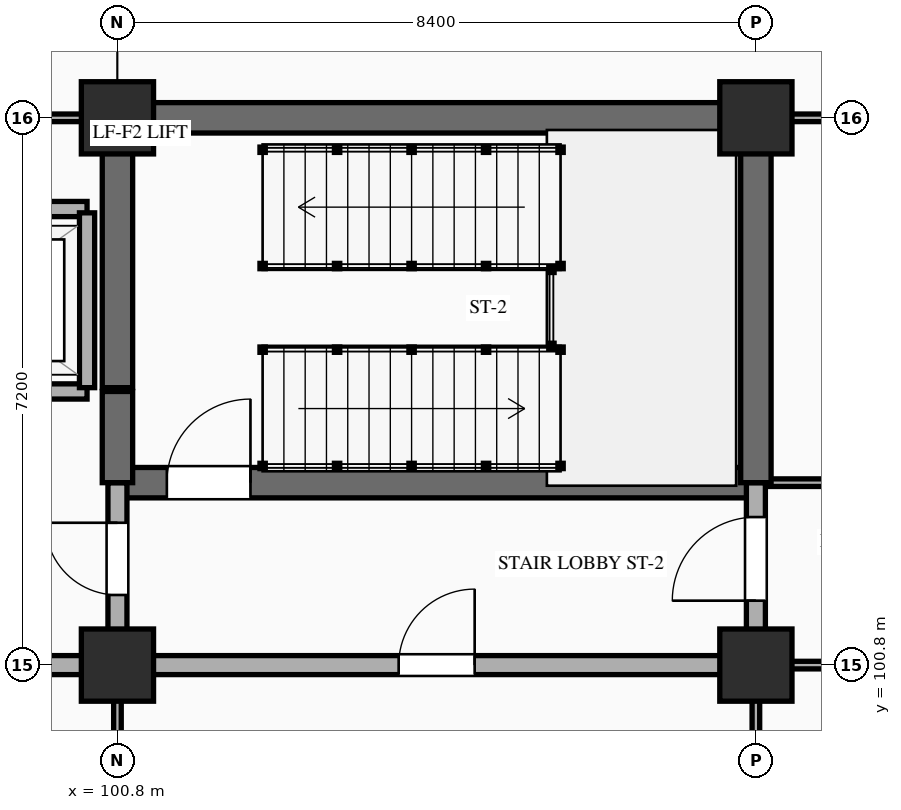
"""IFC4 building model, lengths in metres.
Left out: names, types, materials, properties, quantities, classifications, styles, units other than length and angle.
Written with IfcOpenShell. Run it as: python <this file> out.ifc"""

import sys

from ifc_helpers import new_model, si_unit, direction, frame, frame_2d, origin, origin_2d, place, context, subcontext, project, spatial, rectangle, extrude, element, fill, save


model = new_model("IFC4")
c1 = context("Model", 3, precision=1e-05, world=origin(), true_north=direction((0.0, 1.0)))
c2 = subcontext(c1, "Body", "Model", "MODEL_VIEW")
j1 = project(units=[si_unit("LENGTHUNIT", "METRE"), si_unit("PLANEANGLEUNIT", "RADIAN")], contexts=[c1])
p1 = place(None, origin())
s1 = spatial("IfcSite", under=j1, at=p1, CompositionType="ELEMENT")
p2 = place(p1, origin())
s2 = spatial("IfcBuilding", under=s1, at=p2, CompositionType="ELEMENT")
p3 = place(p2, frame((0.0, 0.0, -10.2)))
s3 = spatial("IfcBuildingStorey", under=s2, at=p3, CompositionType="ELEMENT", Elevation=-10.2)
for number, where, z_axis, x_axis in (
    (1, (100.8, 100.8, 0.0), (0.0, 0.0, 1.0), (1.0, 0.0, 0.0)),
    (2, (100.8, 108.0, 0.0), (0.0, 0.0, 1.0), (1.0, 0.0, 0.0)),
    (3, (109.2, 100.8, 0.0), (0.0, 0.0, 1.0), (1.0, 0.0, 0.0)),
    (4, (109.2, 108.0, 0.0), (0.0, 0.0, 1.0), (1.0, 0.0, 0.0)),
):
    element("IfcColumn", number, at=place(p3, frame(where, z_axis=z_axis, x_axis=x_axis)), inside=s3, PredefinedType="COLUMN", context=c2, shape_type="SweptSolid", body=[
        extrude(rectangle(XDim=0.95, YDim=0.95, at=origin_2d()), origin(), (0.0, 0.0, 1.0), 4.8),
    ])
p4 = place(p3, frame((96.6, 100.8, 0.0), z_axis=(0.0, 0.0, 1.0), x_axis=(1.0, 0.0, 0.0)))
e5 = element("IfcWall", 5, at=p4, inside=s3, PredefinedType="STANDARD", context=c2, shape_type="SweptSolid", body=[
    extrude(rectangle(XDim=12.6, YDim=0.25, at=frame_2d((6.3, 0.0))), origin(), (0.0, 0.0, 1.0), 3.63),
])
p5 = place(p4, frame((7.9, 0.0, 0.0)))
e6 = element("IfcOpeningElement", 6, at=p5, cuts=e5, PredefinedType="OPENING", context=c2, shape_type="SweptSolid", body=[
    extrude(rectangle(XDim=1.0, YDim=2.2, at=frame_2d((0.5, 1.1))), frame((0.0, 0.137, 0.0), z_axis=(0.0, -1.0, 0.0), x_axis=(1.0, 0.0, 0.0)), (0.0, 0.0, 1.0), 0.274),
])
p6 = place(p3, frame((109.2, 100.8, 0.0), z_axis=(0.0, 0.0, 1.0), x_axis=(1.0, 0.0, 0.0)))
e7 = element("IfcWall", 7, at=p6, inside=s3, PredefinedType="STANDARD", context=c2, shape_type="SweptSolid", body=[
    extrude(rectangle(XDim=12.6, YDim=0.1, at=frame_2d((6.3, 0.0))), origin(), (0.0, 0.0, 1.0), 3.63),
])
p7 = place(p6, frame((10.228, 0.0, 0.0)))
e8 = element("IfcOpeningElement", 8, at=p7, cuts=e7, PredefinedType="OPENING", context=c2, shape_type="SweptSolid", body=[
    extrude(rectangle(XDim=0.94, YDim=2.3, at=frame_2d((0.47, 1.15))), frame((0.0, 0.062, 0.0), z_axis=(0.0, -1.0, 0.0), x_axis=(1.0, 0.0, 0.0)), (0.0, 0.0, 1.0), 0.124),
])
p8 = place(p6, frame((1.468, 0.0, 0.0)))
e9 = element("IfcOpeningElement", 9, at=p8, cuts=e7, PredefinedType="OPENING", context=c2, shape_type="SweptSolid", body=[
    extrude(rectangle(XDim=0.86, YDim=2.1, at=frame_2d((0.43, 1.05))), frame((0.0, 0.062, 0.0), z_axis=(0.0, -1.0, 0.0), x_axis=(1.0, 0.0, 0.0)), (0.0, 0.0, 1.0), 0.124),
])
p9 = place(p6, frame((4.14, 0.0, 0.0)))
e10 = element("IfcOpeningElement", 10, at=p9, cuts=e7, PredefinedType="OPENING", context=c2, shape_type="SweptSolid", body=[
    extrude(rectangle(XDim=0.92, YDim=2.15, at=frame_2d((0.46, 1.075))), frame((0.0, 0.062, 0.0), z_axis=(0.0, -1.0, 0.0), x_axis=(1.0, 0.0, 0.0)), (0.0, 0.0, 1.0), 0.124),
])
p10 = place(p6, frame((6.423, 0.0, 0.0)))
e11 = element("IfcOpeningElement", 11, at=p10, cuts=e7, PredefinedType="OPENING", context=c2, shape_type="SweptSolid", body=[
    extrude(rectangle(XDim=0.96, YDim=2.2, at=frame_2d((0.48, 1.1))), frame((0.0, 0.062, 0.0), z_axis=(0.0, -1.0, 0.0), x_axis=(1.0, 0.0, 0.0)), (0.0, 0.0, 1.0), 0.124),
])
p11 = place(p3, frame((100.8, 103.2, 0.0), z_axis=(0.0, 0.0, 1.0), x_axis=(1.0, 0.0, 0.0)))
e12 = element("IfcWall", 12, at=p11, inside=s3, PredefinedType="SHEAR", context=c2, shape_type="SweptSolid", body=[
    extrude(rectangle(XDim=8.4, YDim=0.4, at=frame_2d((4.2, 0.0))), origin(), (0.0, 0.0, 1.0), 4.48),
])
p12 = place(p11, frame((0.65, 0.0, 0.0)))
e13 = element("IfcOpeningElement", 13, at=p12, cuts=e12, PredefinedType="OPENING", context=c2, shape_type="SweptSolid", body=[
    extrude(rectangle(XDim=1.1, YDim=2.2, at=frame_2d((0.55, 1.1))), frame((0.0, 0.212, 0.0), z_axis=(0.0, -1.0, 0.0), x_axis=(1.0, 0.0, 0.0)), (0.0, 0.0, 1.0), 0.424),
])
p13 = place(p3, frame((109.2, 103.2, 0.0), z_axis=(0.0, 0.0, 1.0), x_axis=(1.0, 0.0, 0.0)))
e14 = element("IfcWall", 14, at=p13, inside=s3, PredefinedType="STANDARD", context=c2, shape_type="SweptSolid", body=[
    extrude(rectangle(XDim=8.4, YDim=0.1, at=frame_2d((4.2, 0.0))), origin(), (0.0, 0.0, 1.0), 4.48),
])
p14 = place(p13, frame((3.75, 0.0, 0.0)))
e15 = element("IfcOpeningElement", 15, at=p14, cuts=e14, PredefinedType="OPENING", context=c2, shape_type="SweptSolid", body=[
    extrude(rectangle(XDim=0.9, YDim=2.15, at=frame_2d((0.45, 1.075))), frame((0.0, 0.062, 0.0), z_axis=(0.0, -1.0, 0.0), x_axis=(1.0, 0.0, 0.0)), (0.0, 0.0, 1.0), 0.124),
])
p15 = place(p3, frame((97.4, 104.4, 0.0), z_axis=(0.0, 0.0, 1.0), x_axis=(1.0, 0.0, 0.0)))
e16 = element("IfcWall", 16, at=p15, inside=s3, PredefinedType="STANDARD", context=c2, shape_type="SweptSolid", body=[
    extrude(rectangle(XDim=3.0, YDim=0.2, at=frame_2d((1.5, 0.0))), origin(), (0.0, 0.0, 1.0), 4.48),
])
p16 = place(p15, frame((0.9, 0.0, 0.0)))
e17 = element("IfcOpeningElement", 17, at=p16, cuts=e16, PredefinedType="OPENING", context=c2, shape_type="SweptSolid", body=[
    extrude(rectangle(XDim=1.2, YDim=2.15, at=frame_2d((0.6, 1.075))), frame((0.0, 0.112, 0.0), z_axis=(0.0, -1.0, 0.0), x_axis=(1.0, 0.0, 0.0)), (0.0, 0.0, 1.0), 0.224),
])
p17 = place(p3, frame((97.4, 106.8, 0.0), z_axis=(0.0, 0.0, 1.0), x_axis=(1.0, 0.0, 0.0)))
e18 = element("IfcWall", 18, at=p17, inside=s3, PredefinedType="STANDARD", context=c2, shape_type="SweptSolid", body=[
    extrude(rectangle(XDim=3.0, YDim=0.2, at=frame_2d((1.5, 0.0))), origin(), (0.0, 0.0, 1.0), 4.48),
])
p18 = place(p3, frame((96.65, 108.0, 0.0), z_axis=(0.0, 0.0, 1.0), x_axis=(1.0, 0.0, 0.0)))
e19 = element("IfcWall", 19, at=p18, inside=s3, PredefinedType="STANDARD", context=c2, shape_type="SweptSolid", body=[
    extrude(rectangle(XDim=4.1, YDim=0.1, at=frame_2d((2.05, 0.0))), origin(), (0.0, 0.0, 1.0), 3.63),
])
p19 = place(p3, frame((100.8, 108.0, 0.0), z_axis=(0.0, 0.0, 1.0), x_axis=(1.0, 0.0, 0.0)))
e20 = element("IfcWall", 20, at=p19, inside=s3, PredefinedType="SHEAR", context=c2, shape_type="SweptSolid", body=[
    extrude(rectangle(XDim=8.4, YDim=0.4, at=frame_2d((4.2, 0.0))), origin(), (0.0, 0.0, 1.0), 4.48),
])
p20 = place(p3, frame((109.2, 108.0, 0.0), z_axis=(0.0, 0.0, 1.0), x_axis=(1.0, 0.0, 0.0)))
e21 = element("IfcWall", 21, at=p20, inside=s3, PredefinedType="STANDARD", context=c2, shape_type="SweptSolid", body=[
    extrude(rectangle(XDim=8.4, YDim=0.1, at=frame_2d((4.2, 0.0))), origin(), (0.0, 0.0, 1.0), 3.63),
])
p21 = place(p20, frame((3.7, 0.0, 0.0)))
e22 = element("IfcOpeningElement", 22, at=p21, cuts=e21, PredefinedType="OPENING", context=c2, shape_type="SweptSolid", body=[
    extrude(rectangle(XDim=1.0, YDim=2.25, at=frame_2d((0.5, 1.125))), frame((0.0, 0.062, 0.0), z_axis=(0.0, -1.0, 0.0), x_axis=(1.0, 0.0, 0.0)), (0.0, 0.0, 1.0), 0.124),
])
p22 = place(p3, frame((100.4, 104.45, 0.0), z_axis=(0.0, 0.0, 1.0), x_axis=(0.0, 1.0, 0.0)))
e23 = element("IfcWall", 23, at=p22, inside=s3, PredefinedType="STANDARD", context=c2, shape_type="SweptSolid", body=[
    extrude(rectangle(XDim=2.3, YDim=0.2, at=frame_2d((1.15, 0.0))), origin(), (0.0, 0.0, 1.0), 4.48),
])
p23 = place(p3, frame((100.8, 96.0, 0.0), z_axis=(0.0, 0.0, 1.0), x_axis=(0.0, 1.0, 0.0)))
e24 = element("IfcWall", 24, at=p23, inside=s3, PredefinedType="STANDARD", context=c2, shape_type="SweptSolid", body=[
    extrude(rectangle(XDim=4.8, YDim=0.1, at=frame_2d((2.4, 0.0))), origin(), (0.0, 0.0, 1.0), 3.73),
])
p24 = place(p3, frame((100.8, 100.8, 0.0), z_axis=(0.0, 0.0, 1.0), x_axis=(0.0, 1.0, 0.0)))
e25 = element("IfcWall", 25, at=p24, inside=s3, PredefinedType="STANDARD", context=c2, shape_type="SweptSolid", body=[
    extrude(rectangle(XDim=2.4, YDim=0.25, at=frame_2d((1.2, 0.0))), origin(), (0.0, 0.0, 1.0), 3.73),
])
p25 = place(p24, frame((0.923, 0.0, 0.0)))
e26 = element("IfcOpeningElement", 26, at=p25, cuts=e25, PredefinedType="OPENING", context=c2, shape_type="SweptSolid", body=[
    extrude(rectangle(XDim=0.95, YDim=2.15, at=frame_2d((0.475, 1.075))), frame((0.0, 0.137, 0.0), z_axis=(0.0, -1.0, 0.0), x_axis=(1.0, 0.0, 0.0)), (0.0, 0.0, 1.0), 0.274),
])
p26 = place(p3, frame((100.8, 103.2, 0.0), z_axis=(0.0, 0.0, 1.0), x_axis=(0.0, 1.0, 0.0)))
e27 = element("IfcWall", 27, at=p26, inside=s3, PredefinedType="SHEAR", context=c2, shape_type="SweptSolid", body=[
    extrude(rectangle(XDim=1.2, YDim=0.4, at=frame_2d((0.6, 0.0))), origin(), (0.0, 0.0, 1.0), 4.48),
])
p27 = place(p3, frame((100.8, 104.45, 0.0), z_axis=(0.0, 0.0, 1.0), x_axis=(0.0, 1.0, 0.0)))
e28 = element("IfcWall", 28, at=p27, inside=s3, PredefinedType="SHEAR", context=c2, shape_type="SweptSolid", body=[
    extrude(rectangle(XDim=3.5, YDim=0.4, at=frame_2d((1.75, 0.0))), origin(), (0.0, 0.0, 1.0), 4.48),
])
p28 = place(p3, frame((109.2, 96.0, 0.0), z_axis=(0.0, 0.0, 1.0), x_axis=(0.0, 1.0, 0.0)))
e29 = element("IfcWall", 29, at=p28, inside=s3, PredefinedType="STANDARD", context=c2, shape_type="SweptSolid", body=[
    extrude(rectangle(XDim=4.8, YDim=0.1, at=frame_2d((2.4, 0.0))), origin(), (0.0, 0.0, 1.0), 3.73),
])
p29 = place(p3, frame((109.2, 100.8, 0.0), z_axis=(0.0, 0.0, 1.0), x_axis=(0.0, 1.0, 0.0)))
e30 = element("IfcWall", 30, at=p29, inside=s3, PredefinedType="STANDARD", context=c2, shape_type="SweptSolid", body=[
    extrude(rectangle(XDim=2.4, YDim=0.25, at=frame_2d((1.2, 0.0))), origin(), (0.0, 0.0, 1.0), 3.73),
])
p30 = place(p29, frame((0.847, 0.0, 0.0)))
e31 = element("IfcOpeningElement", 31, at=p30, cuts=e30, PredefinedType="OPENING", context=c2, shape_type="SweptSolid", body=[
    extrude(rectangle(XDim=1.1, YDim=2.2, at=frame_2d((0.55, 1.1))), frame((0.0, 0.137, 0.0), z_axis=(0.0, -1.0, 0.0), x_axis=(1.0, 0.0, 0.0)), (0.0, 0.0, 1.0), 0.274),
])
p31 = place(p3, frame((109.2, 103.2, 0.0), z_axis=(0.0, 0.0, 1.0), x_axis=(0.0, 1.0, 0.0)))
e32 = element("IfcWall", 32, at=p31, inside=s3, PredefinedType="SHEAR", context=c2, shape_type="SweptSolid", body=[
    extrude(rectangle(XDim=4.8, YDim=0.4, at=frame_2d((2.4, 0.0))), origin(), (0.0, 0.0, 1.0), 4.48),
])
p32 = place(p12, origin())
e33 = element("IfcDoor", 33, at=p32, inside=s3, OperationType="SINGLE_SWING_RIGHT", PredefinedType="DOOR", context=c2, shape_type="SweptSolid", body=[
    extrude(rectangle(XDim=1.1, YDim=2.2, at=frame_2d((0.55, 1.1))), frame((0.0, 0.025, 0.0), z_axis=(0.0, -1.0, 0.0), x_axis=(1.0, 0.0, 0.0)), (0.0, 0.0, 1.0), 0.05),
])
fill(e13, e33)
p33 = place(p25, origin())
e34 = element("IfcDoor", 34, at=p33, inside=s3, OperationType="SINGLE_SWING_RIGHT", PredefinedType="DOOR", context=c2, shape_type="SweptSolid", body=[
    extrude(rectangle(XDim=0.95, YDim=2.15, at=frame_2d((0.475, 1.075))), frame((0.0, 0.025, 0.0), z_axis=(0.0, -1.0, 0.0), x_axis=(1.0, 0.0, 0.0)), (0.0, 0.0, 1.0), 0.05),
])
fill(e26, e34)
p34 = place(p30, origin())
e35 = element("IfcDoor", 35, at=p34, inside=s3, OperationType="SINGLE_SWING_LEFT", PredefinedType="DOOR", context=c2, shape_type="SweptSolid", body=[
    extrude(rectangle(XDim=1.1, YDim=2.2, at=frame_2d((0.55, 1.1))), frame((0.0, 0.025, 0.0), z_axis=(0.0, -1.0, 0.0), x_axis=(1.0, 0.0, 0.0)), (0.0, 0.0, 1.0), 0.05),
])
fill(e31, e35)
p35 = place(p5, origin())
e36 = element("IfcDoor", 36, at=p35, inside=s3, OperationType="SINGLE_SWING_RIGHT", PredefinedType="DOOR", context=c2, shape_type="SweptSolid", body=[
    extrude(rectangle(XDim=1.0, YDim=2.2, at=frame_2d((0.5, 1.1))), frame((0.0, 0.025, 0.0), z_axis=(0.0, -1.0, 0.0), x_axis=(1.0, 0.0, 0.0)), (0.0, 0.0, 1.0), 0.05),
])
fill(e6, e36)
save(model, sys.argv[1])
